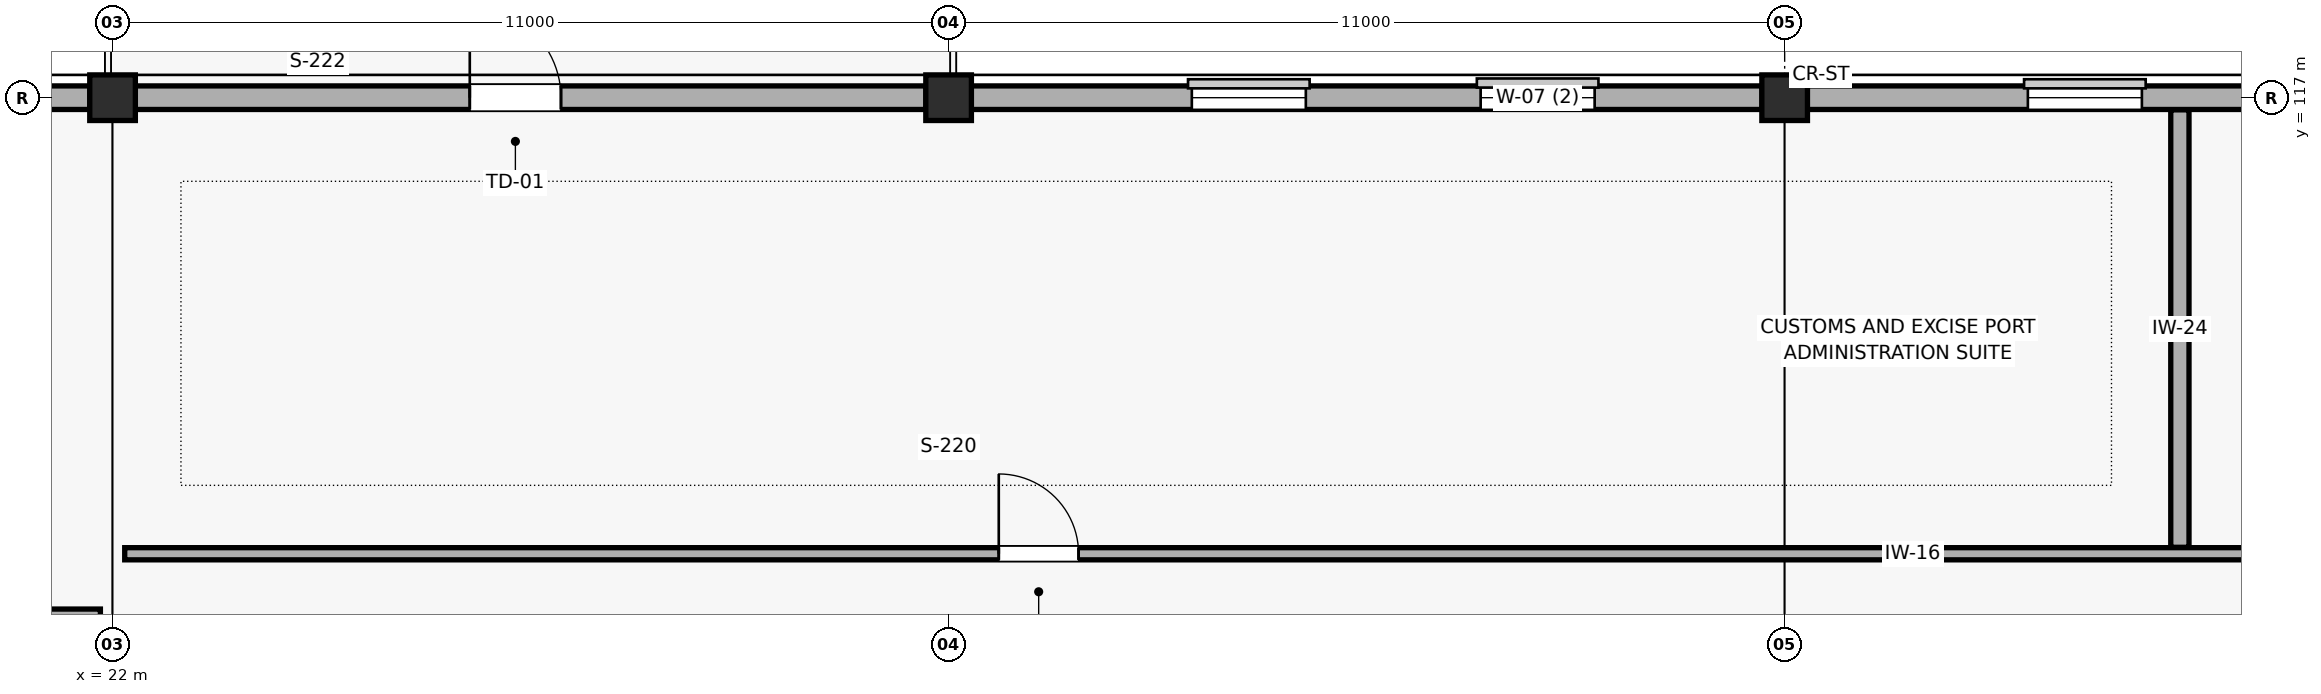
"""IFC4 building model, lengths in metres.
Left out: names, types, materials, properties, quantities, classifications, styles, units other than length and angle.
Written with IfcOpenShell. Run it as: python <this file> out.ifc"""

import sys

from ifc_helpers import new_model, si_unit, direction, frame, frame_2d, origin, origin_2d, place, context, subcontext, project, spatial, rectangle, extrude, element, fill, save


model = new_model("IFC4")
c1 = context("Model", 3, precision=1e-05, world=origin(), true_north=direction((0.0, 1.0)))
c2 = subcontext(c1, "Body", "Model", "MODEL_VIEW")
j1 = project(units=[si_unit("LENGTHUNIT", "METRE"), si_unit("PLANEANGLEUNIT", "RADIAN")], contexts=[c1])
p1 = place(None, origin())
s1 = spatial("IfcSite", under=j1, at=p1, CompositionType="ELEMENT")
p2 = place(p1, origin())
s2 = spatial("IfcBuilding", under=s1, at=p2, CompositionType="ELEMENT")
p3 = place(p2, frame((0.0, 0.0, 9.9)))
s3 = spatial("IfcBuildingStorey", under=s2, at=p3, CompositionType="ELEMENT", Elevation=9.9)
for number, where, z_axis, x_axis in (
    (1, (22.0, 117.0, 0.0), (0.0, 0.0, 1.0), (1.0, 0.0, 0.0)),
    (2, (33.0, 117.0, 0.0), (0.0, 0.0, 1.0), (1.0, 0.0, 0.0)),
    (3, (44.0, 117.0, 0.0), (0.0, 0.0, 1.0), (1.0, 0.0, 0.0)),
):
    element("IfcColumn", number, at=place(p3, frame(where, z_axis=z_axis, x_axis=x_axis)), inside=s3, PredefinedType="COLUMN", context=c2, shape_type="SweptSolid", body=[
        extrude(rectangle(XDim=0.6, YDim=0.6, at=origin_2d()), origin(), (0.0, 0.0, 1.0), 4.2),
    ])
p4 = place(p3, frame((21.702, 117.0, 0.0), z_axis=(0.0, 0.0, 1.0), x_axis=(-1.0, 0.0, 0.0)))
e4 = element("IfcWall", 4, at=p4, inside=s3, PredefinedType="SOLIDWALL", context=c2, shape_type="SweptSolid", body=[
    extrude(rectangle(XDim=10.404, YDim=0.31, at=frame_2d((5.202, 0.0))), origin(), (0.0, 0.0, 1.0), 3.425),
])
p5 = place(p4, frame((2.202, 0.0, 0.95)))
e5 = element("IfcOpeningElement", 5, at=p5, cuts=e4, PredefinedType="OPENING", context=c2, shape_type="SweptSolid", body=[
    extrude(rectangle(XDim=1.5, YDim=2.25, at=frame_2d((0.75, 1.125))), frame((0.0, 0.165, 0.0), z_axis=(0.0, -1.0, 0.0), x_axis=(1.0, 0.0, 0.0)), (0.0, 0.0, 1.0), 0.33),
])
p6 = place(p4, frame((6.002, 0.0, 0.95)))
e6 = element("IfcOpeningElement", 6, at=p6, cuts=e4, PredefinedType="OPENING", context=c2, shape_type="SweptSolid", body=[
    extrude(rectangle(XDim=1.5, YDim=2.25, at=frame_2d((0.75, 1.125))), frame((0.0, 0.165, 0.0), z_axis=(0.0, -1.0, 0.0), x_axis=(1.0, 0.0, 0.0)), (0.0, 0.0, 1.0), 0.33),
])
p7 = place(p3, frame((32.702, 117.0, 0.0), z_axis=(0.0, 0.0, 1.0), x_axis=(-1.0, 0.0, 0.0)))
e7 = element("IfcWall", 7, at=p7, inside=s3, PredefinedType="SOLIDWALL", context=c2, shape_type="SweptSolid", body=[
    extrude(rectangle(XDim=10.404, YDim=0.31, at=frame_2d((5.202, 0.0))), origin(), (0.0, 0.0, 1.0), 3.425),
])
p8 = place(p7, frame((4.802, 0.0, 0.0)))
e8 = element("IfcOpeningElement", 8, at=p8, cuts=e7, PredefinedType="OPENING", context=c2, shape_type="SweptSolid", body=[
    extrude(rectangle(XDim=1.2, YDim=2.2, at=frame_2d((0.6, 1.1))), frame((0.0, 0.165, 0.0), z_axis=(0.0, -1.0, 0.0), x_axis=(1.0, 0.0, 0.0)), (0.0, 0.0, 1.0), 0.33),
])
p9 = place(p3, frame((43.702, 117.0, 0.0), z_axis=(0.0, 0.0, 1.0), x_axis=(-1.0, 0.0, 0.0)))
e9 = element("IfcWall", 9, at=p9, inside=s3, PredefinedType="SOLIDWALL", context=c2, shape_type="SweptSolid", body=[
    extrude(rectangle(XDim=10.404, YDim=0.31, at=frame_2d((5.202, 0.0))), origin(), (0.0, 0.0, 1.0), 3.425),
])
p10 = place(p9, frame((2.202, 0.0, 0.95)))
e10 = element("IfcOpeningElement", 10, at=p10, cuts=e9, PredefinedType="OPENING", context=c2, shape_type="SweptSolid", body=[
    extrude(rectangle(XDim=1.5, YDim=2.25, at=frame_2d((0.75, 1.125))), frame((0.0, 0.165, 0.0), z_axis=(0.0, -1.0, 0.0), x_axis=(1.0, 0.0, 0.0)), (0.0, 0.0, 1.0), 0.33),
])
p11 = place(p9, frame((6.002, 0.0, 0.95)))
e11 = element("IfcOpeningElement", 11, at=p11, cuts=e9, PredefinedType="OPENING", context=c2, shape_type="SweptSolid", body=[
    extrude(rectangle(XDim=1.5, YDim=2.25, at=frame_2d((0.75, 1.125))), frame((0.0, 0.165, 0.0), z_axis=(0.0, -1.0, 0.0), x_axis=(1.0, 0.0, 0.0)), (0.0, 0.0, 1.0), 0.33),
])
p12 = place(p3, frame((54.702, 117.0, 0.0), z_axis=(0.0, 0.0, 1.0), x_axis=(-1.0, 0.0, 0.0)))
e12 = element("IfcWall", 12, at=p12, inside=s3, PredefinedType="SOLIDWALL", context=c2, shape_type="SweptSolid", body=[
    extrude(rectangle(XDim=10.404, YDim=0.31, at=frame_2d((5.202, 0.0))), origin(), (0.0, 0.0, 1.0), 3.425),
])
p13 = place(p12, frame((2.202, 0.0, 0.95)))
e13 = element("IfcOpeningElement", 13, at=p13, cuts=e12, PredefinedType="OPENING", context=c2, shape_type="SweptSolid", body=[
    extrude(rectangle(XDim=1.5, YDim=2.25, at=frame_2d((0.75, 1.125))), frame((0.0, 0.165, 0.0), z_axis=(0.0, -1.0, 0.0), x_axis=(1.0, 0.0, 0.0)), (0.0, 0.0, 1.0), 0.33),
])
p14 = place(p12, frame((6.002, 0.0, 0.95)))
e14 = element("IfcOpeningElement", 14, at=p14, cuts=e12, PredefinedType="OPENING", context=c2, shape_type="SweptSolid", body=[
    extrude(rectangle(XDim=1.5, YDim=2.25, at=frame_2d((0.75, 1.125))), frame((0.0, 0.165, 0.0), z_axis=(0.0, -1.0, 0.0), x_axis=(1.0, 0.0, 0.0)), (0.0, 0.0, 1.0), 0.33),
])
p15 = place(p3, frame((16.45, 110.2, 0.0), z_axis=(0.0, 0.0, 1.0), x_axis=(1.0, 0.0, 0.0)))
e15 = element("IfcWall", 15, at=p15, inside=s3, PredefinedType="PARTITIONING", context=c2, shape_type="SweptSolid", body=[
    extrude(rectangle(XDim=5.39, YDim=0.145, at=frame_2d((2.695, 0.0))), origin(), (0.0, 0.0, 1.0), 3.98),
])
p16 = place(p15, frame((2.95, 0.0, 0.0)))
e16 = element("IfcOpeningElement", 16, at=p16, cuts=e15, PredefinedType="OPENING", context=c2, shape_type="SweptSolid", body=[
    extrude(rectangle(XDim=1.0, YDim=2.15, at=frame_2d((0.5, 1.075))), frame((0.0, 0.083, 0.0), z_axis=(0.0, -1.0, 0.0), x_axis=(1.0, 0.0, 0.0)), (0.0, 0.0, 1.0), 0.165),
])
p17 = place(p3, frame((22.16, 111.0, 0.0), z_axis=(0.0, 0.0, 1.0), x_axis=(1.0, 0.0, 0.0)))
e17 = element("IfcWall", 17, at=p17, inside=s3, PredefinedType="PARTITIONING", context=c2, shape_type="SweptSolid", body=[
    extrude(rectangle(XDim=43.68, YDim=0.16, at=frame_2d((21.84, 0.0))), origin(), (0.0, 0.0, 1.0), 3.525),
])
p18 = place(p17, frame((11.5, 0.0, 0.0)))
e18 = element("IfcOpeningElement", 18, at=p18, cuts=e17, PredefinedType="OPENING", context=c2, shape_type="SweptSolid", body=[
    extrude(rectangle(XDim=1.05, YDim=2.2, at=frame_2d((0.525, 1.1))), frame((0.0, 0.09, 0.0), z_axis=(0.0, -1.0, 0.0), x_axis=(1.0, 0.0, 0.0)), (0.0, 0.0, 1.0), 0.18),
])
p19 = place(p17, frame((34.5, 0.0, 0.0)))
e19 = element("IfcOpeningElement", 19, at=p19, cuts=e17, PredefinedType="OPENING", context=c2, shape_type="SweptSolid", body=[
    extrude(rectangle(XDim=1.15, YDim=2.2, at=frame_2d((0.575, 1.1))), frame((0.0, 0.09, 0.0), z_axis=(0.0, -1.0, 0.0), x_axis=(1.0, 0.0, 0.0)), (0.0, 0.0, 1.0), 0.18),
])
p20 = place(p3, frame((49.2, 111.085, 0.0), z_axis=(0.0, 0.0, 1.0), x_axis=(0.0, 1.0, 0.0)))
e20 = element("IfcWall", 20, at=p20, inside=s3, PredefinedType="PARTITIONING", context=c2, shape_type="SweptSolid", body=[
    extrude(rectangle(XDim=5.755, YDim=0.24, at=frame_2d((2.877, 0.0))), origin(), (0.0, 0.0, 1.0), 3.425),
])
p21 = place(p8, frame((1.2, 0.0, 0.0), z_axis=(0.0, 0.0, 1.0), x_axis=(-1.0, 0.0, 0.0)))
e21 = element("IfcDoor", 21, at=p21, inside=s3, OperationType="SINGLE_SWING_LEFT", PredefinedType="DOOR", context=c2, shape_type="SweptSolid", body=[
    extrude(rectangle(XDim=1.2, YDim=2.2, at=frame_2d((0.6, 1.1))), frame((0.0, 0.025, 0.0), z_axis=(0.0, -1.0, 0.0), x_axis=(1.0, 0.0, 0.0)), (0.0, 0.0, 1.0), 0.05),
])
fill(e8, e21)
p22 = place(p10, origin())
e22 = element("IfcWindow", 22, at=p22, inside=s3, PartitioningType="SINGLE_PANEL", PredefinedType="WINDOW", context=c2, shape_type="SweptSolid", body=[
    extrude(rectangle(XDim=1.5, YDim=2.25, at=frame_2d((0.75, 1.125))), frame((0.0, 0.03, 0.0), z_axis=(0.0, -1.0, 0.0), x_axis=(1.0, 0.0, 0.0)), (0.0, 0.0, 1.0), 0.06),
])
fill(e10, e22)
p23 = place(p11, origin())
e23 = element("IfcWindow", 23, at=p23, inside=s3, PartitioningType="SINGLE_PANEL", PredefinedType="WINDOW", context=c2, shape_type="SweptSolid", body=[
    extrude(rectangle(XDim=1.5, YDim=2.25, at=frame_2d((0.75, 1.125))), frame((0.0, 0.03, 0.0), z_axis=(0.0, -1.0, 0.0), x_axis=(1.0, 0.0, 0.0)), (0.0, 0.0, 1.0), 0.06),
])
fill(e11, e23)
p24 = place(p14, origin())
e24 = element("IfcWindow", 24, at=p24, inside=s3, PartitioningType="SINGLE_PANEL", PredefinedType="WINDOW", context=c2, shape_type="SweptSolid", body=[
    extrude(rectangle(XDim=1.5, YDim=2.25, at=frame_2d((0.75, 1.125))), frame((0.0, 0.03, 0.0), z_axis=(0.0, -1.0, 0.0), x_axis=(1.0, 0.0, 0.0)), (0.0, 0.0, 1.0), 0.06),
])
fill(e14, e24)
p25 = place(p18, origin())
e25 = element("IfcDoor", 25, at=p25, inside=s3, OperationType="SINGLE_SWING_LEFT", PredefinedType="DOOR", context=c2, shape_type="SweptSolid", body=[
    extrude(rectangle(XDim=1.05, YDim=2.2, at=frame_2d((0.525, 1.1))), frame((0.0, 0.025, 0.0), z_axis=(0.0, -1.0, 0.0), x_axis=(1.0, 0.0, 0.0)), (0.0, 0.0, 1.0), 0.05),
])
fill(e18, e25)
save(model, sys.argv[1])
